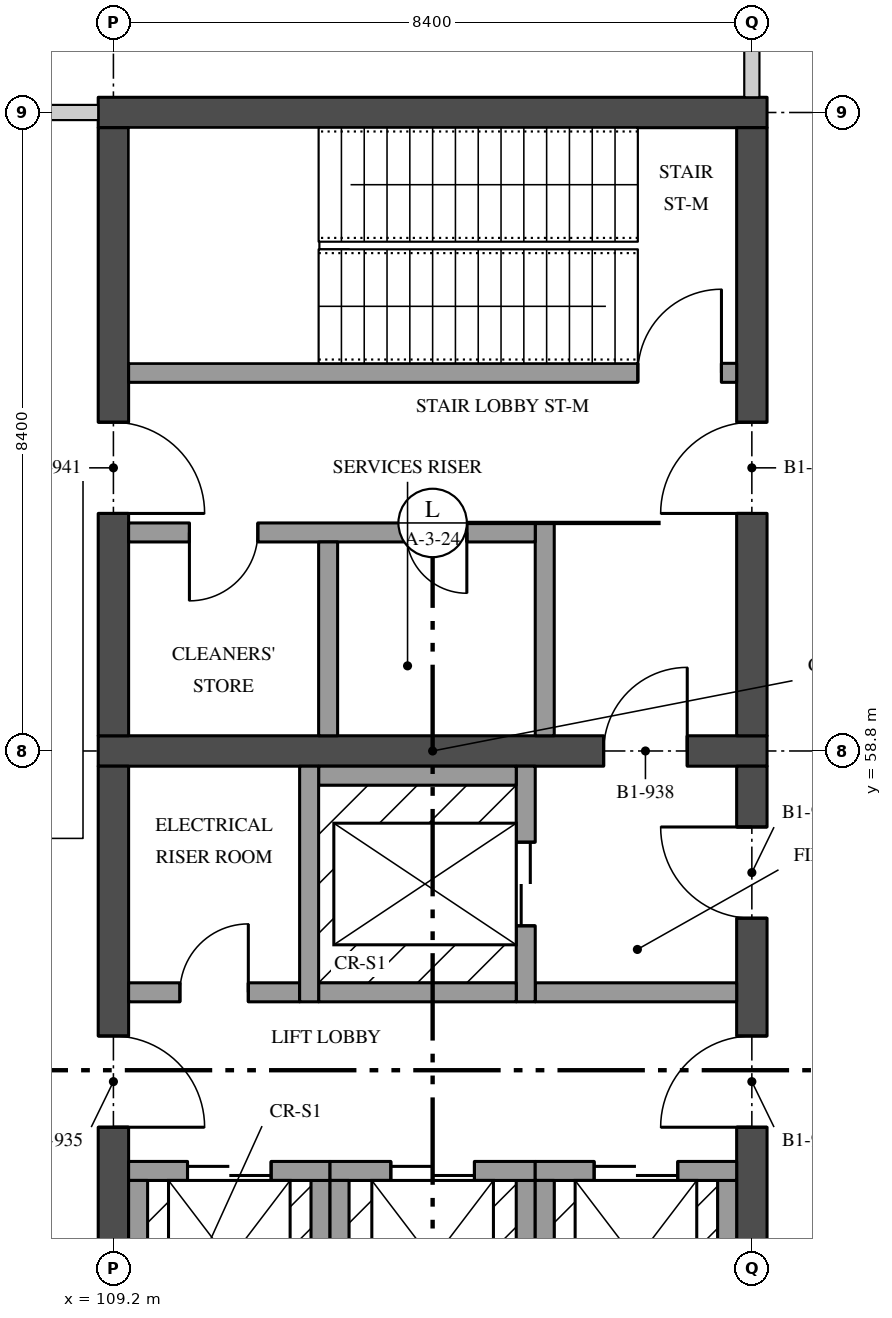
"""IFC4 building model, lengths in metres.
Left out: names, types, materials, properties, quantities, classifications, styles, units other than length and angle.
Written with IfcOpenShell. Run it as: python <this file> out.ifc"""

import sys

from ifc_helpers import new_model, si_unit, direction, frame, frame_2d, origin, place, context, subcontext, project, spatial, rectangle, extrude, element, fill, save


model = new_model("IFC4")
c1 = context("Model", 3, precision=1e-05, world=origin(), true_north=direction((0.0, 1.0)))
c2 = subcontext(c1, "Body", "Model", "MODEL_VIEW")
j1 = project(units=[si_unit("LENGTHUNIT", "METRE"), si_unit("PLANEANGLEUNIT", "RADIAN")], contexts=[c1])
p1 = place(None, origin())
s1 = spatial("IfcSite", under=j1, at=p1, CompositionType="ELEMENT")
p2 = place(p1, origin())
s2 = spatial("IfcBuilding", under=s1, at=p2, CompositionType="ELEMENT")
p3 = place(p2, frame((0.0, 0.0, -4.5)))
s3 = spatial("IfcBuildingStorey", under=s2, at=p3, CompositionType="ELEMENT", Elevation=-4.5)
p4 = place(p3, frame((109.0, 58.8, 0.0), z_axis=(0.0, 0.0, 1.0), x_axis=(1.0, 0.0, 0.0)))
e1 = element("IfcWall", 1, at=p4, inside=s3, PredefinedType="SHEAR", context=c2, shape_type="SweptSolid", body=[
    extrude(rectangle(XDim=8.8, YDim=0.4, at=frame_2d((4.4, 0.0))), origin(), (0.0, 0.0, 1.0), 4.05),
])
p5 = place(p4, frame((6.65, 0.0, 0.0)))
e2 = element("IfcOpeningElement", 2, at=p5, cuts=e1, PredefinedType="OPENING", context=c2, shape_type="SweptSolid", body=[
    extrude(rectangle(XDim=1.1, YDim=2.1, at=frame_2d((0.55, 1.05))), frame((0.0, 0.21, 0.0), z_axis=(0.0, -1.0, 0.0), x_axis=(1.0, 0.0, 0.0)), (0.0, 0.0, 1.0), 0.42),
])
p6 = place(p3, frame((109.2, 50.6, 0.0), z_axis=(0.0, 0.0, 1.0), x_axis=(0.0, 1.0, 0.0)))
e3 = element("IfcWall", 3, at=p6, inside=s3, PredefinedType="SHEAR", context=c2, shape_type="SweptSolid", body=[
    extrude(rectangle(XDim=8.0, YDim=0.4, at=frame_2d((4.0, 0.0))), origin(), (0.0, 0.0, 1.0), 4.05),
])
p7 = place(p6, frame((3.25, 0.0, 0.0)))
e4 = element("IfcOpeningElement", 4, at=p7, cuts=e3, PredefinedType="OPENING", context=c2, shape_type="SweptSolid", body=[
    extrude(rectangle(XDim=1.2, YDim=2.1, at=frame_2d((0.6, 1.05))), frame((0.0, 0.21, 0.0), z_axis=(0.0, -1.0, 0.0), x_axis=(1.0, 0.0, 0.0)), (0.0, 0.0, 1.0), 0.42),
])
p8 = place(p3, frame((117.6, 50.6, 0.0), z_axis=(0.0, 0.0, 1.0), x_axis=(0.0, 1.0, 0.0)))
e5 = element("IfcWall", 5, at=p8, inside=s3, PredefinedType="SHEAR", context=c2, shape_type="SweptSolid", body=[
    extrude(rectangle(XDim=8.0, YDim=0.4, at=frame_2d((4.0, 0.0))), origin(), (0.0, 0.0, 1.0), 4.05),
])
p9 = place(p8, frame((3.25, 0.0, 0.0)))
e6 = element("IfcOpeningElement", 6, at=p9, cuts=e5, PredefinedType="OPENING", context=c2, shape_type="SweptSolid", body=[
    extrude(rectangle(XDim=1.2, YDim=2.1, at=frame_2d((0.6, 1.05))), frame((0.0, 0.21, 0.0), z_axis=(0.0, -1.0, 0.0), x_axis=(1.0, 0.0, 0.0)), (0.0, 0.0, 1.0), 0.42),
])
p10 = place(p8, frame((6.0, 0.0, 0.0)))
e7 = element("IfcOpeningElement", 7, at=p10, cuts=e5, PredefinedType="OPENING", context=c2, shape_type="SweptSolid", body=[
    extrude(rectangle(XDim=1.2, YDim=2.1, at=frame_2d((0.6, 1.05))), frame((0.0, 0.21, 0.0), z_axis=(0.0, -1.0, 0.0), x_axis=(1.0, 0.0, 0.0)), (0.0, 0.0, 1.0), 0.42),
])
p11 = place(p3, frame((109.4, 55.625, 0.0), z_axis=(0.0, 0.0, 1.0), x_axis=(1.0, 0.0, 0.0)))
e8 = element("IfcWall", 8, at=p11, inside=s3, PredefinedType="SOLIDWALL", context=c2, shape_type="SweptSolid", body=[
    extrude(rectangle(XDim=2.25, YDim=0.25, at=frame_2d((1.125, 0.0))), origin(), (0.0, 0.0, 1.0), 4.05),
])
p12 = place(p11, frame((0.675, 0.0, 0.0)))
e9 = element("IfcOpeningElement", 9, at=p12, cuts=e8, PredefinedType="OPENING", context=c2, shape_type="SweptSolid", body=[
    extrude(rectangle(XDim=0.9, YDim=2.1, at=frame_2d((0.45, 1.05))), frame((0.0, 0.135, 0.0), z_axis=(0.0, -1.0, 0.0), x_axis=(1.0, 0.0, 0.0)), (0.0, 0.0, 1.0), 0.27),
])
p13 = place(p3, frame((114.75, 55.625, 0.0), z_axis=(0.0, 0.0, 1.0), x_axis=(1.0, 0.0, 0.0)))
e10 = element("IfcWall", 10, at=p13, inside=s3, PredefinedType="SOLIDWALL", context=c2, shape_type="SweptSolid", body=[
    extrude(rectangle(XDim=2.65, YDim=0.25, at=frame_2d((1.325, 0.0))), origin(), (0.0, 0.0, 1.0), 4.05),
])
p14 = place(p3, frame((109.0, 67.2, 0.0), z_axis=(0.0, 0.0, 1.0), x_axis=(1.0, 0.0, 0.0)))
e11 = element("IfcWall", 11, at=p14, inside=s3, PredefinedType="SHEAR", context=c2, shape_type="SweptSolid", body=[
    extrude(rectangle(XDim=8.8, YDim=0.4, at=frame_2d((4.4, 0.0))), origin(), (0.0, 0.0, 1.0), 4.05),
])
p15 = place(p3, frame((109.2, 59.0, 0.0), z_axis=(0.0, 0.0, 1.0), x_axis=(0.0, 1.0, 0.0)))
e12 = element("IfcWall", 12, at=p15, inside=s3, PredefinedType="SHEAR", context=c2, shape_type="SweptSolid", body=[
    extrude(rectangle(XDim=8.0, YDim=0.4, at=frame_2d((4.0, 0.0))), origin(), (0.0, 0.0, 1.0), 4.05),
])
p16 = place(p15, frame((2.925, 0.0, 0.0)))
e13 = element("IfcOpeningElement", 13, at=p16, cuts=e12, PredefinedType="OPENING", context=c2, shape_type="SweptSolid", body=[
    extrude(rectangle(XDim=1.2, YDim=2.1, at=frame_2d((0.6, 1.05))), frame((0.0, 0.21, 0.0), z_axis=(0.0, -1.0, 0.0), x_axis=(1.0, 0.0, 0.0)), (0.0, 0.0, 1.0), 0.42),
])
p17 = place(p3, frame((117.6, 59.0, 0.0), z_axis=(0.0, 0.0, 1.0), x_axis=(0.0, 1.0, 0.0)))
e14 = element("IfcWall", 14, at=p17, inside=s3, PredefinedType="SHEAR", context=c2, shape_type="SweptSolid", body=[
    extrude(rectangle(XDim=8.0, YDim=0.4, at=frame_2d((4.0, 0.0))), origin(), (0.0, 0.0, 1.0), 4.05),
])
p18 = place(p17, frame((2.925, 0.0, 0.0)))
e15 = element("IfcOpeningElement", 15, at=p18, cuts=e14, PredefinedType="OPENING", context=c2, shape_type="SweptSolid", body=[
    extrude(rectangle(XDim=1.2, YDim=2.1, at=frame_2d((0.6, 1.05))), frame((0.0, 0.21, 0.0), z_axis=(0.0, -1.0, 0.0), x_axis=(1.0, 0.0, 0.0)), (0.0, 0.0, 1.0), 0.42),
])
p19 = place(p3, frame((117.4, 63.775, 0.0), z_axis=(0.0, 0.0, 1.0), x_axis=(-1.0, 0.0, 0.0)))
e16 = element("IfcWall", 16, at=p19, inside=s3, PredefinedType="SOLIDWALL", context=c2, shape_type="SweptSolid", body=[
    extrude(rectangle(XDim=8.0, YDim=0.25, at=frame_2d((4.0, 0.0))), origin(), (0.0, 0.0, 1.0), 4.05),
])
p20 = place(p19, frame((0.2, 0.0, 0.0)))
e17 = element("IfcOpeningElement", 17, at=p20, cuts=e16, PredefinedType="OPENING", context=c2, shape_type="SweptSolid", body=[
    extrude(rectangle(XDim=1.1, YDim=2.1, at=frame_2d((0.55, 1.05))), frame((0.0, 0.135, 0.0), z_axis=(0.0, -1.0, 0.0), x_axis=(1.0, 0.0, 0.0)), (0.0, 0.0, 1.0), 0.27),
])
p21 = place(p3, frame((114.875, 61.8, 0.0), z_axis=(0.0, 0.0, 1.0), x_axis=(0.0, -1.0, 0.0)))
e18 = element("IfcWall", 18, at=p21, inside=s3, PredefinedType="SOLIDWALL", context=c2, shape_type="SweptSolid", body=[
    extrude(rectangle(XDim=2.8, YDim=0.25, at=frame_2d((1.4, 0.0))), origin(), (0.0, 0.0, 1.0), 4.05),
])
p22 = place(p3, frame((114.75, 61.675, 0.0), z_axis=(0.0, 0.0, 1.0), x_axis=(-1.0, 0.0, 0.0)))
e19 = element("IfcWall", 19, at=p22, inside=s3, PredefinedType="SOLIDWALL", context=c2, shape_type="SweptSolid", body=[
    extrude(rectangle(XDim=5.35, YDim=0.25, at=frame_2d((2.675, 0.0))), origin(), (0.0, 0.0, 1.0), 4.05),
])
p23 = place(p22, frame((3.65, 0.0, 0.0)))
e20 = element("IfcOpeningElement", 20, at=p23, cuts=e19, PredefinedType="OPENING", context=c2, shape_type="SweptSolid", body=[
    extrude(rectangle(XDim=0.9, YDim=2.1, at=frame_2d((0.45, 1.05))), frame((0.0, 0.135, 0.0), z_axis=(0.0, -1.0, 0.0), x_axis=(1.0, 0.0, 0.0)), (0.0, 0.0, 1.0), 0.27),
])
p24 = place(p22, frame((0.9, 0.0, 0.0)))
e21 = element("IfcOpeningElement", 21, at=p24, cuts=e19, PredefinedType="OPENING", context=c2, shape_type="SweptSolid", body=[
    extrude(rectangle(XDim=0.8, YDim=2.1, at=frame_2d((0.4, 1.05))), frame((0.0, 0.135, 0.0), z_axis=(0.0, -1.0, 0.0), x_axis=(1.0, 0.0, 0.0)), (0.0, 0.0, 1.0), 0.27),
])
p25 = place(p3, frame((112.025, 61.55, 0.0), z_axis=(0.0, 0.0, 1.0), x_axis=(0.0, -1.0, 0.0)))
e22 = element("IfcWall", 22, at=p25, inside=s3, PredefinedType="SOLIDWALL", context=c2, shape_type="SweptSolid", body=[
    extrude(rectangle(XDim=2.55, YDim=0.25, at=frame_2d((1.275, 0.0))), origin(), (0.0, 0.0, 1.0), 4.05),
])
p26 = place(p3, frame((114.625, 55.5, 0.0), z_axis=(0.0, 0.0, 1.0), x_axis=(0.0, 1.0, 0.0)))
e23 = element("IfcWall", 23, at=p26, inside=s3, PredefinedType="SOLIDWALL", context=c2, shape_type="SweptSolid", body=[
    extrude(rectangle(XDim=3.1, YDim=0.25, at=frame_2d((1.55, 0.0))), origin(), (0.0, 0.0, 1.0), 4.05),
])
p27 = place(p26, frame((1.0, 0.0, 0.0)))
e24 = element("IfcOpeningElement", 24, at=p27, cuts=e23, PredefinedType="OPENING", context=c2, shape_type="SweptSolid", body=[
    extrude(rectangle(XDim=1.1, YDim=2.1, at=frame_2d((0.55, 1.05))), frame((0.0, 0.135, 0.0), z_axis=(0.0, -1.0, 0.0), x_axis=(1.0, 0.0, 0.0)), (0.0, 0.0, 1.0), 0.27),
])
for number, where, z_axis, x_axis in (
    (25, (111.9, 58.475, 0.0), (0.0, 0.0, 1.0), (1.0, 0.0, 0.0)),
    (26, (111.9, 55.625, 0.0), (0.0, 0.0, 1.0), (1.0, 0.0, 0.0)),
):
    element("IfcWall", number, at=place(p3, frame(where, z_axis=z_axis, x_axis=x_axis)), inside=s3, PredefinedType="SOLIDWALL", context=c2, shape_type="SweptSolid", body=[
        extrude(rectangle(XDim=2.6, YDim=0.25, at=frame_2d((1.3, 0.0))), origin(), (0.0, 0.0, 1.0), 4.05),
    ])
p28 = place(p3, frame((111.775, 55.5, 0.0), z_axis=(0.0, 0.0, 1.0), x_axis=(0.0, 1.0, 0.0)))
e27 = element("IfcWall", 27, at=p28, inside=s3, PredefinedType="SOLIDWALL", context=c2, shape_type="SweptSolid", body=[
    extrude(rectangle(XDim=3.1, YDim=0.25, at=frame_2d((1.55, 0.0))), origin(), (0.0, 0.0, 1.0), 4.05),
])
p29 = place(p3, frame((111.925, 50.85, 0.0), z_axis=(0.0, 0.0, 1.0), x_axis=(0.0, 1.0, 0.0)))
e28 = element("IfcWall", 28, at=p29, inside=s3, PredefinedType="SOLIDWALL", context=c2, shape_type="SweptSolid", body=[
    extrude(rectangle(XDim=2.3, YDim=0.25, at=frame_2d((1.15, 0.0))), origin(), (0.0, 0.0, 1.0), 4.05),
])
p30 = place(p3, frame((109.4, 53.275, 0.0), z_axis=(0.0, 0.0, 1.0), x_axis=(1.0, 0.0, 0.0)))
e29 = element("IfcWall", 29, at=p30, inside=s3, PredefinedType="SOLIDWALL", context=c2, shape_type="SweptSolid", body=[
    extrude(rectangle(XDim=2.65, YDim=0.25, at=frame_2d((1.325, 0.0))), origin(), (0.0, 0.0, 1.0), 4.05),
])
p31 = place(p30, frame((0.775, 0.0, 0.0)))
e30 = element("IfcOpeningElement", 30, at=p31, cuts=e29, PredefinedType="OPENING", context=c2, shape_type="SweptSolid", body=[
    extrude(rectangle(XDim=1.1, YDim=2.1, at=frame_2d((0.55, 1.05))), frame((0.0, 0.135, 0.0), z_axis=(0.0, -1.0, 0.0), x_axis=(1.0, 0.0, 0.0)), (0.0, 0.0, 1.0), 0.27),
])
for number, where, z_axis, x_axis in (
    (31, (109.525, 50.85, 0.0), (0.0, 0.0, 1.0), (0.0, 1.0, 0.0)),
    (32, (114.625, 50.85, 0.0), (0.0, 0.0, 1.0), (0.0, 1.0, 0.0)),
):
    element("IfcWall", number, at=place(p3, frame(where, z_axis=z_axis, x_axis=x_axis)), inside=s3, PredefinedType="SOLIDWALL", context=c2, shape_type="SweptSolid", body=[
        extrude(rectangle(XDim=2.3, YDim=0.25, at=frame_2d((1.15, 0.0))), origin(), (0.0, 0.0, 1.0), 4.05),
    ])
p32 = place(p3, frame((112.05, 53.275, 0.0), z_axis=(0.0, 0.0, 1.0), x_axis=(1.0, 0.0, 0.0)))
e33 = element("IfcWall", 33, at=p32, inside=s3, PredefinedType="SOLIDWALL", context=c2, shape_type="SweptSolid", body=[
    extrude(rectangle(XDim=2.7, YDim=0.25, at=frame_2d((1.35, 0.0))), origin(), (0.0, 0.0, 1.0), 4.05),
])
p33 = place(p32, frame((0.8, 0.0, 0.0)))
e34 = element("IfcOpeningElement", 34, at=p33, cuts=e33, PredefinedType="OPENING", context=c2, shape_type="SweptSolid", body=[
    extrude(rectangle(XDim=1.1, YDim=2.1, at=frame_2d((0.55, 1.05))), frame((0.0, 0.135, 0.0), z_axis=(0.0, -1.0, 0.0), x_axis=(1.0, 0.0, 0.0)), (0.0, 0.0, 1.0), 0.27),
])
for number, where, z_axis, x_axis in (
    (35, (112.175, 50.85, 0.0), (0.0, 0.0, 1.0), (0.0, 1.0, 0.0)),
    (36, (117.275, 50.85, 0.0), (0.0, 0.0, 1.0), (0.0, 1.0, 0.0)),
):
    element("IfcWall", number, at=place(p3, frame(where, z_axis=z_axis, x_axis=x_axis)), inside=s3, PredefinedType="SOLIDWALL", context=c2, shape_type="SweptSolid", body=[
        extrude(rectangle(XDim=2.3, YDim=0.25, at=frame_2d((1.15, 0.0))), origin(), (0.0, 0.0, 1.0), 4.05),
    ])
p34 = place(p3, frame((114.75, 53.275, 0.0), z_axis=(0.0, 0.0, 1.0), x_axis=(1.0, 0.0, 0.0)))
e37 = element("IfcWall", 37, at=p34, inside=s3, PredefinedType="SOLIDWALL", context=c2, shape_type="SweptSolid", body=[
    extrude(rectangle(XDim=2.65, YDim=0.25, at=frame_2d((1.325, 0.0))), origin(), (0.0, 0.0, 1.0), 4.05),
])
p35 = place(p34, frame((0.775, 0.0, 0.0)))
e38 = element("IfcOpeningElement", 38, at=p35, cuts=e37, PredefinedType="OPENING", context=c2, shape_type="SweptSolid", body=[
    extrude(rectangle(XDim=1.1, YDim=2.1, at=frame_2d((0.55, 1.05))), frame((0.0, 0.135, 0.0), z_axis=(0.0, -1.0, 0.0), x_axis=(1.0, 0.0, 0.0)), (0.0, 0.0, 1.0), 0.27),
])
p36 = place(p3, frame((114.875, 50.85, 0.0), z_axis=(0.0, 0.0, 1.0), x_axis=(0.0, 1.0, 0.0)))
e39 = element("IfcWall", 39, at=p36, inside=s3, PredefinedType="SOLIDWALL", context=c2, shape_type="SweptSolid", body=[
    extrude(rectangle(XDim=2.3, YDim=0.25, at=frame_2d((1.15, 0.0))), origin(), (0.0, 0.0, 1.0), 4.05),
])
p37 = place(p3, frame((101.25, 67.2, 0.0), z_axis=(0.0, 0.0, 1.0), x_axis=(1.0, 0.0, 0.0)))
e40 = element("IfcWall", 40, at=p37, inside=s3, PredefinedType="PARTITIONING", context=c2, shape_type="SweptSolid", body=[
    extrude(rectangle(XDim=7.75, YDim=0.2, at=frame_2d((3.875, 0.0))), origin(), (0.0, 0.0, 1.0), 4.05),
])
p38 = place(p3, frame((117.6, 67.4, 0.0), z_axis=(0.0, 0.0, 1.0), x_axis=(0.0, 1.0, 0.0)))
e41 = element("IfcWall", 41, at=p38, inside=s3, PredefinedType="PARTITIONING", context=c2, shape_type="SweptSolid", body=[
    extrude(rectangle(XDim=7.75, YDim=0.2, at=frame_2d((3.875, 0.0))), origin(), (0.0, 0.0, 1.0), 4.05),
])
p39 = place(p38, frame((3.1, 0.0, 0.0)))
e42 = element("IfcOpeningElement", 42, at=p39, cuts=e41, PredefinedType="OPENING", context=c2, shape_type="SweptSolid", body=[
    extrude(rectangle(XDim=1.0, YDim=2.1, at=frame_2d((0.5, 1.05))), frame((0.0, 0.11, 0.0), z_axis=(0.0, -1.0, 0.0), x_axis=(1.0, 0.0, 0.0)), (0.0, 0.0, 1.0), 0.22),
])
p40 = place(p7, frame((1.2, 0.0, 0.0), z_axis=(0.0, 0.0, 1.0), x_axis=(-1.0, 0.0, 0.0)))
e43 = element("IfcDoor", 43, at=p40, inside=s3, OperationType="SINGLE_SWING_LEFT", PredefinedType="DOOR", context=c2, shape_type="SweptSolid", body=[
    extrude(rectangle(XDim=1.2, YDim=2.1, at=frame_2d((0.6, 1.05))), frame((0.0, 0.035, 0.0), z_axis=(0.0, -1.0, 0.0), x_axis=(1.0, 0.0, 0.0)), (0.0, 0.0, 1.0), 0.07),
])
fill(e4, e43)
p41 = place(p9, origin())
e44 = element("IfcDoor", 44, at=p41, inside=s3, OperationType="SINGLE_SWING_RIGHT", PredefinedType="DOOR", context=c2, shape_type="SweptSolid", body=[
    extrude(rectangle(XDim=1.2, YDim=2.1, at=frame_2d((0.6, 1.05))), frame((0.0, 0.035, 0.0), z_axis=(0.0, -1.0, 0.0), x_axis=(1.0, 0.0, 0.0)), (0.0, 0.0, 1.0), 0.07),
])
fill(e6, e44)
p42 = place(p10, origin())
e45 = element("IfcDoor", 45, at=p42, inside=s3, OperationType="SINGLE_SWING_LEFT", PredefinedType="DOOR", context=c2, shape_type="SweptSolid", body=[
    extrude(rectangle(XDim=1.2, YDim=2.1, at=frame_2d((0.6, 1.05))), frame((0.0, 0.035, 0.0), z_axis=(0.0, -1.0, 0.0), x_axis=(1.0, 0.0, 0.0)), (0.0, 0.0, 1.0), 0.07),
])
fill(e7, e45)
p43 = place(p5, origin())
e46 = element("IfcDoor", 46, at=p43, inside=s3, OperationType="SINGLE_SWING_LEFT", PredefinedType="DOOR", context=c2, shape_type="SweptSolid", body=[
    extrude(rectangle(XDim=1.1, YDim=2.1, at=frame_2d((0.55, 1.05))), frame((0.0, 0.035, 0.0), z_axis=(0.0, -1.0, 0.0), x_axis=(1.0, 0.0, 0.0)), (0.0, 0.0, 1.0), 0.07),
])
fill(e2, e46)
p44 = place(p12, origin())
e47 = element("IfcDoor", 47, at=p44, inside=s3, OperationType="SINGLE_SWING_LEFT", PredefinedType="DOOR", context=c2, shape_type="SweptSolid", body=[
    extrude(rectangle(XDim=0.9, YDim=2.1, at=frame_2d((0.45, 1.05))), frame((0.0, 0.05, 0.0), z_axis=(0.0, -1.0, 0.0), x_axis=(1.0, 0.0, 0.0)), (0.0, 0.0, 1.0), 0.1),
])
fill(e9, e47)
p45 = place(p23, origin())
e48 = element("IfcDoor", 48, at=p45, inside=s3, OperationType="SINGLE_SWING_LEFT", PredefinedType="DOOR", context=c2, shape_type="SweptSolid", body=[
    extrude(rectangle(XDim=0.9, YDim=2.1, at=frame_2d((0.45, 1.05))), frame((0.0, 0.035, 0.0), z_axis=(0.0, -1.0, 0.0), x_axis=(1.0, 0.0, 0.0)), (0.0, 0.0, 1.0), 0.07),
])
fill(e20, e48)
p46 = place(p16, frame((1.2, 0.0, 0.0), z_axis=(0.0, 0.0, 1.0), x_axis=(-1.0, 0.0, 0.0)))
e49 = element("IfcDoor", 49, at=p46, inside=s3, OperationType="SINGLE_SWING_LEFT", PredefinedType="DOOR", context=c2, shape_type="SweptSolid", body=[
    extrude(rectangle(XDim=1.2, YDim=2.1, at=frame_2d((0.6, 1.05))), frame((0.0, 0.035, 0.0), z_axis=(0.0, -1.0, 0.0), x_axis=(1.0, 0.0, 0.0)), (0.0, 0.0, 1.0), 0.07),
])
fill(e13, e49)
p47 = place(p18, origin())
e50 = element("IfcDoor", 50, at=p47, inside=s3, OperationType="SINGLE_SWING_RIGHT", PredefinedType="DOOR", context=c2, shape_type="SweptSolid", body=[
    extrude(rectangle(XDim=1.2, YDim=2.1, at=frame_2d((0.6, 1.05))), frame((0.0, 0.035, 0.0), z_axis=(0.0, -1.0, 0.0), x_axis=(1.0, 0.0, 0.0)), (0.0, 0.0, 1.0), 0.07),
])
fill(e15, e50)
p48 = place(p24, origin())
e51 = element("IfcDoor", 51, at=p48, inside=s3, OperationType="SINGLE_SWING_RIGHT", PredefinedType="DOOR", context=c2, shape_type="SweptSolid", body=[
    extrude(rectangle(XDim=0.8, YDim=2.1, at=frame_2d((0.4, 1.05))), frame((0.0, 0.035, 0.0), z_axis=(0.0, -1.0, 0.0), x_axis=(1.0, 0.0, 0.0)), (0.0, 0.0, 1.0), 0.07),
])
fill(e21, e51)
p49 = place(p20, frame((1.1, 0.0, 0.0), z_axis=(0.0, 0.0, 1.0), x_axis=(-1.0, 0.0, 0.0)))
e52 = element("IfcDoor", 52, at=p49, inside=s3, OperationType="SINGLE_SWING_LEFT", PredefinedType="DOOR", context=c2, shape_type="SweptSolid", body=[
    extrude(rectangle(XDim=1.1, YDim=2.1, at=frame_2d((0.55, 1.05))), frame((0.0, 0.035, 0.0), z_axis=(0.0, -1.0, 0.0), x_axis=(1.0, 0.0, 0.0)), (0.0, 0.0, 1.0), 0.07),
])
fill(e17, e52)
p50 = place(p27, origin())
e53 = element("IfcDoor", 53, at=p50, inside=s3, OperationType="DOUBLE_DOOR_SLIDING", PredefinedType="DOOR", context=c2, shape_type="SweptSolid", body=[
    extrude(rectangle(XDim=1.1, YDim=2.1, at=frame_2d((0.55, 1.05))), frame((0.0, 0.04, 0.0), z_axis=(0.0, -1.0, 0.0), x_axis=(1.0, 0.0, 0.0)), (0.0, 0.0, 1.0), 0.08),
])
fill(e24, e53)
p51 = place(p31, origin())
e54 = element("IfcDoor", 54, at=p51, inside=s3, OperationType="DOUBLE_DOOR_SLIDING", PredefinedType="DOOR", context=c2, shape_type="SweptSolid", body=[
    extrude(rectangle(XDim=1.1, YDim=2.1, at=frame_2d((0.55, 1.05))), frame((0.0, 0.04, 0.0), z_axis=(0.0, -1.0, 0.0), x_axis=(1.0, 0.0, 0.0)), (0.0, 0.0, 1.0), 0.08),
])
fill(e30, e54)
p52 = place(p33, origin())
e55 = element("IfcDoor", 55, at=p52, inside=s3, OperationType="DOUBLE_DOOR_SLIDING", PredefinedType="DOOR", context=c2, shape_type="SweptSolid", body=[
    extrude(rectangle(XDim=1.1, YDim=2.1, at=frame_2d((0.55, 1.05))), frame((0.0, 0.04, 0.0), z_axis=(0.0, -1.0, 0.0), x_axis=(1.0, 0.0, 0.0)), (0.0, 0.0, 1.0), 0.08),
])
fill(e34, e55)
p53 = place(p35, origin())
e56 = element("IfcDoor", 56, at=p53, inside=s3, OperationType="DOUBLE_DOOR_SLIDING", PredefinedType="DOOR", context=c2, shape_type="SweptSolid", body=[
    extrude(rectangle(XDim=1.1, YDim=2.1, at=frame_2d((0.55, 1.05))), frame((0.0, 0.04, 0.0), z_axis=(0.0, -1.0, 0.0), x_axis=(1.0, 0.0, 0.0)), (0.0, 0.0, 1.0), 0.08),
])
fill(e38, e56)
save(model, sys.argv[1])
